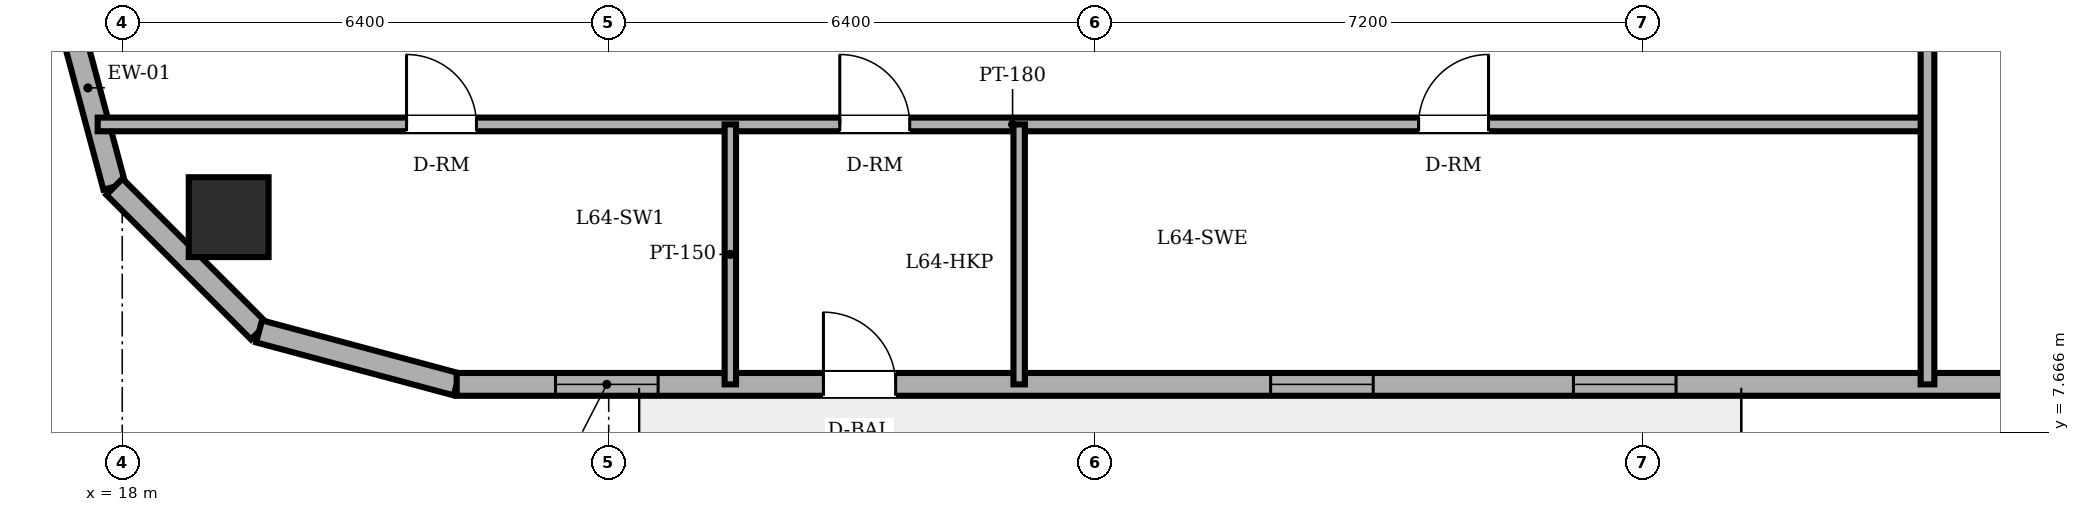
"""IFC4 building model, lengths in metres.
Left out: names, types, materials, properties, quantities, classifications, styles, units other than length and angle.
Written with IfcOpenShell. Run it as: python <this file> out.ifc"""

import sys

from ifc_helpers import new_model, si_unit, direction, frame, frame_2d, origin, origin_2d, place, context, subcontext, project, spatial, rectangle, circle, extrude, element, fill, save


model = new_model("IFC4")
c1 = context("Model", 3, precision=1e-05, world=origin(), true_north=direction((0.0, 1.0)))
c2 = subcontext(c1, "Body", "Model", "MODEL_VIEW")
j1 = project(units=[si_unit("LENGTHUNIT", "METRE"), si_unit("PLANEANGLEUNIT", "RADIAN")], contexts=[c1])
p1 = place(None, origin())
s1 = spatial("IfcSite", under=j1, at=p1, CompositionType="ELEMENT")
p2 = place(p1, origin())
s2 = spatial("IfcBuilding", under=s1, at=p2, CompositionType="ELEMENT")
p3 = place(p2, frame((0.0, 0.0, 244.5)))
s3 = spatial("IfcBuildingStorey", under=s2, at=p3, CompositionType="ELEMENT", Elevation=244.5)
p4 = place(p3, frame((19.4, 10.5, 0.0), z_axis=(0.0, 0.0, 1.0), x_axis=(1.0, 0.0, 0.0)))
e1 = element("IfcColumn", 1, at=p4, inside=s3, PredefinedType="COLUMN", context=c2, shape_type="SweptSolid", body=[
    extrude(circle(Radius=0.525, at=origin_2d()), origin(), (0.0, 0.0, 1.0), 3.6),
])
p5 = place(p3, frame((17.2, 13.5, 0.0), z_axis=(0.0, 0.0, 1.0), x_axis=(0.258932525951, -0.965895412042, 0.0)))
e2 = element("IfcWall", 2, at=p5, inside=s3, PredefinedType="SOLIDWALL", context=c2, shape_type="SweptSolid", body=[
    extrude(rectangle(XDim=2.692, YDim=0.3, at=frame_2d((1.346, 0.0))), origin(), (0.0, 0.0, 1.0), 3.36),
])
p6 = place(p3, frame((17.897, 10.9, 0.0), z_axis=(0.0, 0.0, 1.0), x_axis=(0.707152139074, -0.70706142039, 0.0)))
e3 = element("IfcWall", 3, at=p6, inside=s3, PredefinedType="SOLIDWALL", context=c2, shape_type="SweptSolid", body=[
    extrude(rectangle(XDim=2.691, YDim=0.3, at=frame_2d((1.346, 0.0))), origin(), (0.0, 0.0, 1.0), 3.36),
])
p7 = place(p3, frame((19.8, 8.997, 0.0), z_axis=(0.0, 0.0, 1.0), x_axis=(0.965889330541, -0.258955210695, 0.0)))
e4 = element("IfcWall", 4, at=p7, inside=s3, PredefinedType="SOLIDWALL", context=c2, shape_type="SweptSolid", body=[
    extrude(rectangle(XDim=2.692, YDim=0.3, at=frame_2d((1.346, 0.0))), origin(), (0.0, 0.0, 1.0), 3.36),
])
p8 = place(p3, frame((22.4, 8.3, 0.0), z_axis=(0.0, 0.0, 1.0), x_axis=(1.0, 0.0, 0.0)))
e5 = element("IfcWall", 5, at=p8, inside=s3, PredefinedType="SOLIDWALL", context=c2, shape_type="SweptSolid", body=[
    extrude(rectangle(XDim=32.485, YDim=0.3, at=frame_2d((16.243, 0.0))), origin(), (0.0, 0.0, 1.0), 3.36),
])
p9 = place(p8, frame((4.825, 0.0, 0.0)))
e6 = element("IfcOpeningElement", 6, at=p9, cuts=e5, PredefinedType="OPENING", context=c2, shape_type="SweptSolid", body=[
    extrude(rectangle(XDim=0.95, YDim=2.2, at=frame_2d((0.475, 1.1))), frame((0.0, 0.16, 0.0), z_axis=(0.0, -1.0, 0.0), x_axis=(1.0, 0.0, 0.0)), (0.0, 0.0, 1.0), 0.32),
])
p10 = place(p8, frame((1.3, 0.0, 0.85)))
e7 = element("IfcOpeningElement", 7, at=p10, cuts=e5, PredefinedType="OPENING", context=c2, shape_type="SweptSolid", body=[
    extrude(rectangle(XDim=1.35, YDim=1.55, at=frame_2d((0.675, 0.775))), frame((0.0, 0.16, 0.0), z_axis=(0.0, -1.0, 0.0), x_axis=(1.0, 0.0, 0.0)), (0.0, 0.0, 1.0), 0.32),
])
p11 = place(p8, frame((10.708, 0.0, 0.85)))
e8 = element("IfcOpeningElement", 8, at=p11, cuts=e5, PredefinedType="OPENING", context=c2, shape_type="SweptSolid", body=[
    extrude(rectangle(XDim=1.35, YDim=1.55, at=frame_2d((0.675, 0.775))), frame((0.0, 0.16, 0.0), z_axis=(0.0, -1.0, 0.0), x_axis=(1.0, 0.0, 0.0)), (0.0, 0.0, 1.0), 0.32),
])
p12 = place(p8, frame((14.692, 0.0, 0.85)))
e9 = element("IfcOpeningElement", 9, at=p12, cuts=e5, PredefinedType="OPENING", context=c2, shape_type="SweptSolid", body=[
    extrude(rectangle(XDim=1.35, YDim=1.55, at=frame_2d((0.675, 0.775))), frame((0.0, 0.16, 0.0), z_axis=(0.0, -1.0, 0.0), x_axis=(1.0, 0.0, 0.0)), (0.0, 0.0, 1.0), 0.32),
])
p13 = place(p8, frame((22.937, 0.0, 0.85)))
e10 = element("IfcOpeningElement", 10, at=p13, cuts=e5, PredefinedType="OPENING", context=c2, shape_type="SweptSolid", body=[
    extrude(rectangle(XDim=1.35, YDim=1.55, at=frame_2d((0.675, 0.775))), frame((0.0, 0.16, 0.0), z_axis=(0.0, -1.0, 0.0), x_axis=(1.0, 0.0, 0.0)), (0.0, 0.0, 1.0), 0.32),
])
p14 = place(p8, frame((27.198, 0.0, 0.85)))
e11 = element("IfcOpeningElement", 11, at=p14, cuts=e5, PredefinedType="OPENING", context=c2, shape_type="SweptSolid", body=[
    extrude(rectangle(XDim=1.35, YDim=1.55, at=frame_2d((0.675, 0.775))), frame((0.0, 0.16, 0.0), z_axis=(0.0, -1.0, 0.0), x_axis=(1.0, 0.0, 0.0)), (0.0, 0.0, 1.0), 0.32),
])
p15 = place(p3, frame((17.677, 11.72, 0.0), z_axis=(0.0, 0.0, 1.0), x_axis=(1.0, 0.0, 0.0)))
e12 = element("IfcWall", 12, at=p15, inside=s3, PredefinedType="PARTITIONING", context=c2, shape_type="SweptSolid", body=[
    extrude(rectangle(XDim=24.073, YDim=0.18, at=frame_2d((12.037, 0.0))), origin(), (0.0, 0.0, 1.0), 3.36),
])
p16 = place(p15, frame((9.763, 0.0, 0.0)))
e13 = element("IfcOpeningElement", 13, at=p16, cuts=e12, PredefinedType="OPENING", context=c2, shape_type="SweptSolid", body=[
    extrude(rectangle(XDim=0.92, YDim=2.1, at=frame_2d((0.46, 1.05))), frame((0.0, 0.1, 0.0), z_axis=(0.0, -1.0, 0.0), x_axis=(1.0, 0.0, 0.0)), (0.0, 0.0, 1.0), 0.2),
])
p17 = place(p15, frame((4.063, 0.0, 0.0)))
e14 = element("IfcOpeningElement", 14, at=p17, cuts=e12, PredefinedType="OPENING", context=c2, shape_type="SweptSolid", body=[
    extrude(rectangle(XDim=0.92, YDim=2.1, at=frame_2d((0.46, 1.05))), frame((0.0, 0.1, 0.0), z_axis=(0.0, -1.0, 0.0), x_axis=(1.0, 0.0, 0.0)), (0.0, 0.0, 1.0), 0.2),
])
p18 = place(p15, frame((17.378, 0.0, 0.0)))
e15 = element("IfcOpeningElement", 15, at=p18, cuts=e12, PredefinedType="OPENING", context=c2, shape_type="SweptSolid", body=[
    extrude(rectangle(XDim=0.92, YDim=2.1, at=frame_2d((0.46, 1.05))), frame((0.0, 0.1, 0.0), z_axis=(0.0, -1.0, 0.0), x_axis=(1.0, 0.0, 0.0)), (0.0, 0.0, 1.0), 0.2),
])
for number, where, z_axis, x_axis in (
    (16, (26.0, 8.3, 0.0), (0.0, 0.0, 1.0), (0.0, 1.0, 0.0)),
    (17, (29.8, 8.3, 0.0), (0.0, 0.0, 1.0), (0.0, 1.0, 0.0)),
):
    element("IfcWall", number, at=place(p3, frame(where, z_axis=z_axis, x_axis=x_axis)), inside=s3, PredefinedType="PARTITIONING", context=c2, shape_type="SweptSolid", body=[
        extrude(rectangle(XDim=3.42, YDim=0.15, at=frame_2d((1.71, 0.0))), origin(), (0.0, 0.0, 1.0), 3.36),
    ])
p19 = place(p3, frame((41.75, 8.3, 0.0), z_axis=(0.0, 0.0, 1.0), x_axis=(0.0, 1.0, 0.0)))
e18 = element("IfcWall", 18, at=p19, inside=s3, PredefinedType="PARTITIONING", context=c2, shape_type="SweptSolid", body=[
    extrude(rectangle(XDim=14.52, YDim=0.18, at=frame_2d((7.26, 0.0))), origin(), (0.0, 0.0, 1.0), 3.36),
])
p20 = place(p9, origin())
e19 = element("IfcDoor", 19, at=p20, inside=s3, OperationType="SINGLE_SWING_LEFT", PredefinedType="DOOR", context=c2, shape_type="SweptSolid", body=[
    extrude(rectangle(XDim=0.95, YDim=2.2, at=frame_2d((0.475, 1.1))), frame((0.0, 0.025, 0.0), z_axis=(0.0, -1.0, 0.0), x_axis=(1.0, 0.0, 0.0)), (0.0, 0.0, 1.0), 0.05),
])
fill(e6, e19)
p21 = place(p10, origin())
e20 = element("IfcWindow", 20, at=p21, inside=s3, PartitioningType="SINGLE_PANEL", PredefinedType="WINDOW", context=c2, shape_type="SweptSolid", body=[
    extrude(rectangle(XDim=1.35, YDim=1.55, at=frame_2d((0.675, 0.775))), frame((0.0, 0.03, 0.0), z_axis=(0.0, -1.0, 0.0), x_axis=(1.0, 0.0, 0.0)), (0.0, 0.0, 1.0), 0.06),
])
fill(e7, e20)
p22 = place(p11, origin())
e21 = element("IfcWindow", 21, at=p22, inside=s3, PartitioningType="SINGLE_PANEL", PredefinedType="WINDOW", context=c2, shape_type="SweptSolid", body=[
    extrude(rectangle(XDim=1.35, YDim=1.55, at=frame_2d((0.675, 0.775))), frame((0.0, 0.03, 0.0), z_axis=(0.0, -1.0, 0.0), x_axis=(1.0, 0.0, 0.0)), (0.0, 0.0, 1.0), 0.06),
])
fill(e8, e21)
p23 = place(p12, origin())
e22 = element("IfcWindow", 22, at=p23, inside=s3, PartitioningType="SINGLE_PANEL", PredefinedType="WINDOW", context=c2, shape_type="SweptSolid", body=[
    extrude(rectangle(XDim=1.35, YDim=1.55, at=frame_2d((0.675, 0.775))), frame((0.0, 0.03, 0.0), z_axis=(0.0, -1.0, 0.0), x_axis=(1.0, 0.0, 0.0)), (0.0, 0.0, 1.0), 0.06),
])
fill(e9, e22)
p24 = place(p16, origin())
e23 = element("IfcDoor", 23, at=p24, inside=s3, OperationType="SINGLE_SWING_LEFT", PredefinedType="DOOR", context=c2, shape_type="SweptSolid", body=[
    extrude(rectangle(XDim=0.92, YDim=2.1, at=frame_2d((0.46, 1.05))), frame((0.0, 0.025, 0.0), z_axis=(0.0, -1.0, 0.0), x_axis=(1.0, 0.0, 0.0)), (0.0, 0.0, 1.0), 0.05),
])
fill(e13, e23)
p25 = place(p17, origin())
e24 = element("IfcDoor", 24, at=p25, inside=s3, OperationType="SINGLE_SWING_LEFT", PredefinedType="DOOR", context=c2, shape_type="SweptSolid", body=[
    extrude(rectangle(XDim=0.92, YDim=2.1, at=frame_2d((0.46, 1.05))), frame((0.0, 0.025, 0.0), z_axis=(0.0, -1.0, 0.0), x_axis=(1.0, 0.0, 0.0)), (0.0, 0.0, 1.0), 0.05),
])
fill(e14, e24)
p26 = place(p18, origin())
e25 = element("IfcDoor", 25, at=p26, inside=s3, OperationType="SINGLE_SWING_RIGHT", PredefinedType="DOOR", context=c2, shape_type="SweptSolid", body=[
    extrude(rectangle(XDim=0.92, YDim=2.1, at=frame_2d((0.46, 1.05))), frame((0.0, 0.025, 0.0), z_axis=(0.0, -1.0, 0.0), x_axis=(1.0, 0.0, 0.0)), (0.0, 0.0, 1.0), 0.05),
])
fill(e15, e25)
save(model, sys.argv[1])
